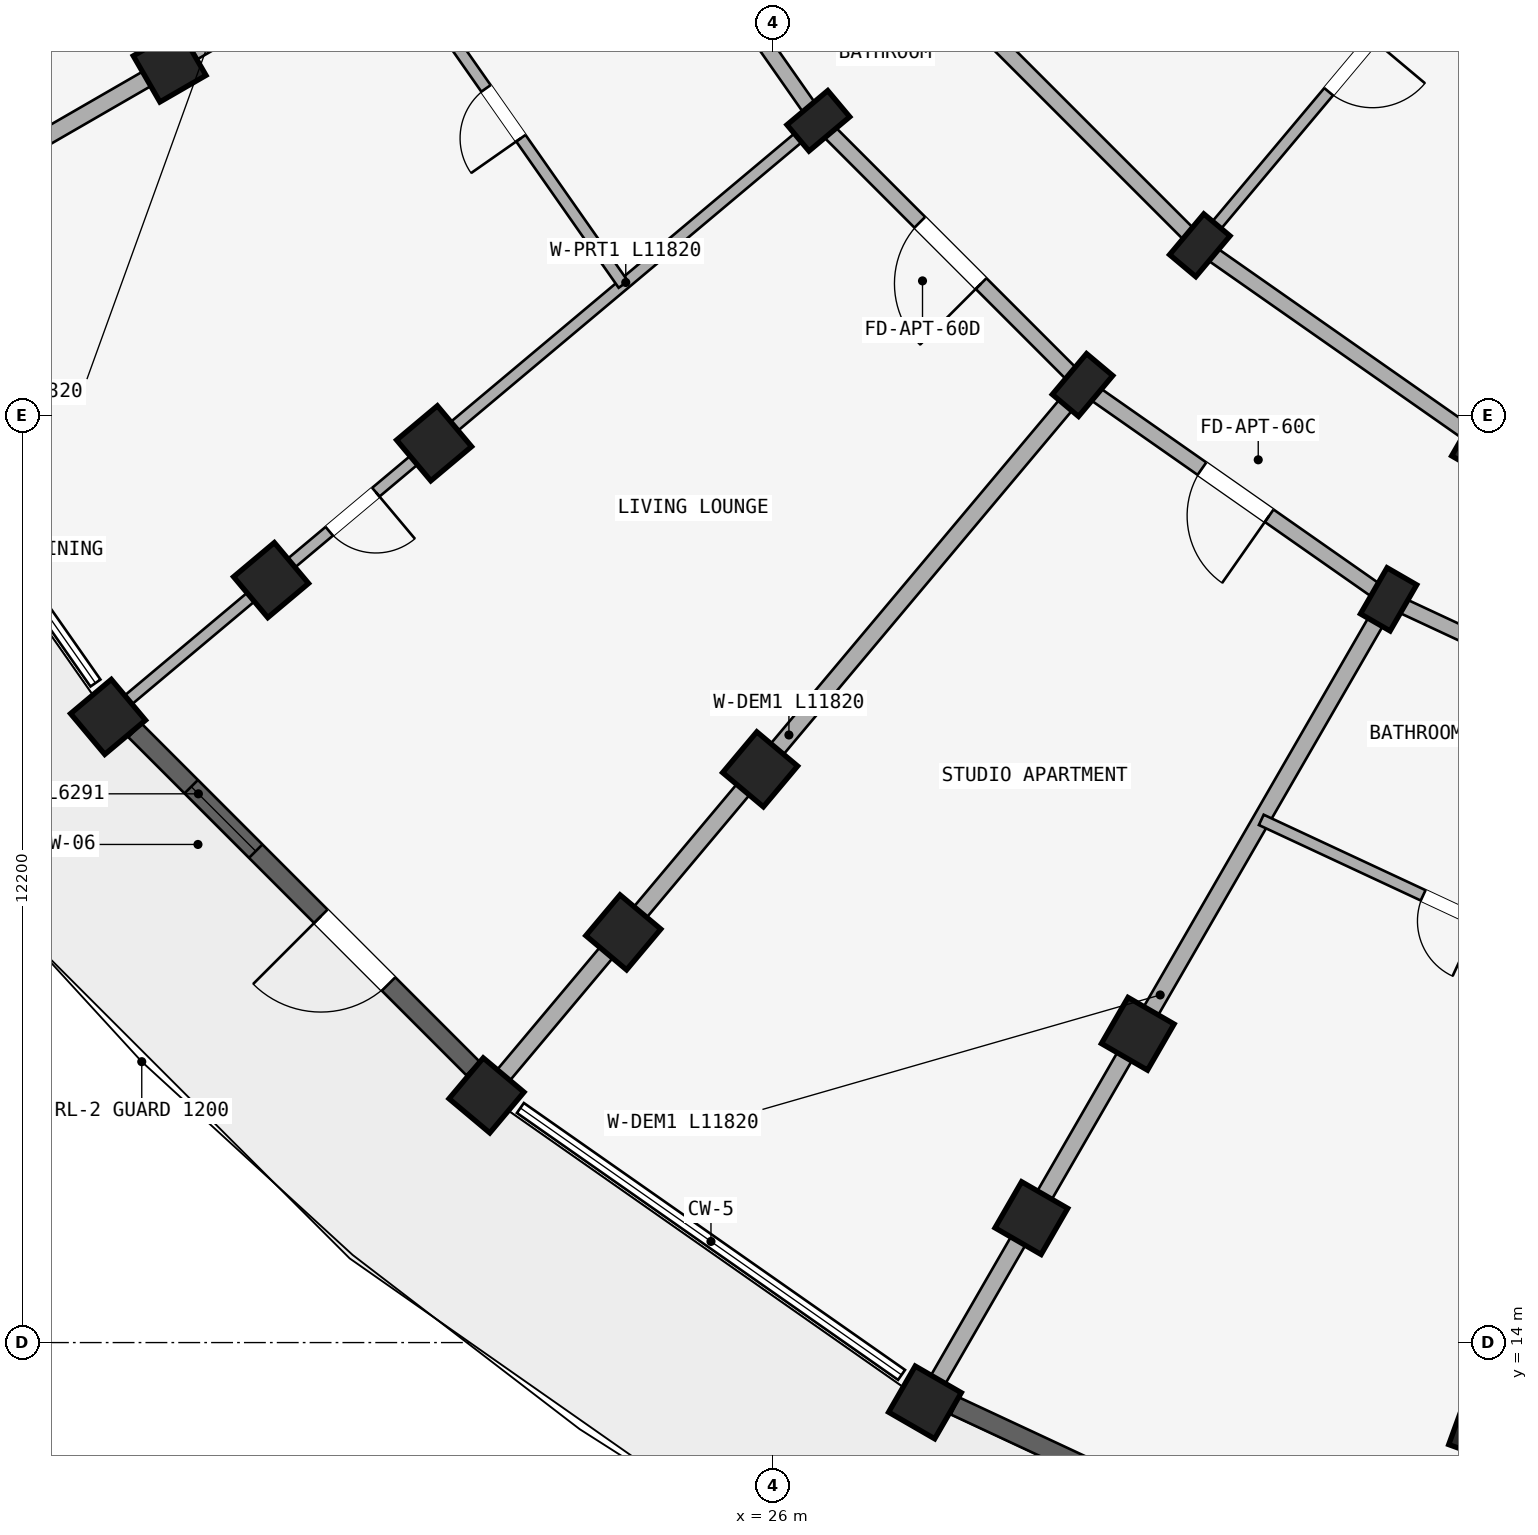
"""IFC4 building model, lengths in metres.
Left out: names, types, materials, properties, quantities, classifications, styles, units other than length and angle.
Written with IfcOpenShell. Run it as: python <this file> out.ifc"""

import sys

from ifc_helpers import new_model, si_unit, direction, frame, frame_2d, origin, origin_2d, place, context, subcontext, project, spatial, rectangle, extrude, element, fill, save


model = new_model("IFC4")
c1 = context("Model", 3, precision=1e-05, world=origin(), true_north=direction((0.0, 1.0)))
c2 = subcontext(c1, "Body", "Model", "MODEL_VIEW")
j1 = project(units=[si_unit("LENGTHUNIT", "METRE"), si_unit("PLANEANGLEUNIT", "RADIAN")], contexts=[c1])
p1 = place(None, origin())
s1 = spatial("IfcSite", under=j1, at=p1, CompositionType="ELEMENT")
p2 = place(p1, origin())
s2 = spatial("IfcBuilding", under=s1, at=p2, CompositionType="ELEMENT")
p3 = place(p2, frame((0.0, 0.0, 24.45)))
s3 = spatial("IfcBuildingStorey", under=s2, at=p3, CompositionType="ELEMENT", Elevation=24.45)
p4 = place(p3, frame((35.34, 12.868, 0.0), z_axis=(0.0, 0.0, 1.0), x_axis=(-0.939692620786, 0.342020143326, 0.0)))
e1 = element("IfcColumn", 1, at=p4, inside=s3, PredefinedType="COLUMN", context=c2, shape_type="SweptSolid", body=[
    extrude(rectangle(XDim=0.7, YDim=0.7, at=origin_2d()), origin(), (0.0, 0.0, 1.0), 2.93),
])
for number, where, z_axis, x_axis in (
    (2, (35.3, 25.856, 0.0), (0.0, 0.0, 1.0), (-0.866, 0.5, 0.0)),
    (3, (34.1, 23.778, 0.0), (0.0, 0.0, 1.0), (-0.866, 0.5, 0.0)),
):
    element("IfcColumn", number, at=place(p3, frame(where, z_axis=z_axis, x_axis=x_axis)), inside=s3, PredefinedType="COLUMN", context=c2, shape_type="SweptSolid", body=[
        extrude(rectangle(XDim=0.45, YDim=0.7, at=origin_2d()), origin(), (0.0, 0.0, 1.0), 2.93),
    ])
for number, where, z_axis, x_axis in (
    (4, (30.8, 18.062, 0.0), (0.0, 0.0, 1.0), (-0.866, 0.5, 0.0)),
    (5, (29.4, 15.637, 0.0), (0.0, 0.0, 1.0), (-0.866, 0.5, 0.0)),
):
    element("IfcColumn", number, at=place(p3, frame(where, z_axis=z_axis, x_axis=x_axis)), inside=s3, PredefinedType="COLUMN", context=c2, shape_type="SweptSolid", body=[
        extrude(rectangle(XDim=0.7, YDim=0.7, at=origin_2d()), origin(), (0.0, 0.0, 1.0), 2.93),
    ])
p5 = place(p3, frame((28.0, 13.213, 0.0), z_axis=(0.0, 0.0, 1.0), x_axis=(-0.866025403784, 0.5, 0.0)))
e6 = element("IfcColumn", 6, at=p5, inside=s3, PredefinedType="COLUMN", context=c2, shape_type="SweptSolid", body=[
    extrude(rectangle(XDim=0.7, YDim=0.7, at=origin_2d()), origin(), (0.0, 0.0, 1.0), 2.97),
])
for number, where, z_axis, x_axis in (
    (7, (31.616, 28.436, 0.0), (0.0, 0.0, 1.0), (-0.766, 0.643, 0.0)),
    (8, (30.073, 26.598, 0.0), (0.0, 0.0, 1.0), (-0.766, 0.643, 0.0)),
):
    element("IfcColumn", number, at=place(p3, frame(where, z_axis=z_axis, x_axis=x_axis)), inside=s3, PredefinedType="COLUMN", context=c2, shape_type="SweptSolid", body=[
        extrude(rectangle(XDim=0.45, YDim=0.7, at=origin_2d()), origin(), (0.0, 0.0, 1.0), 2.93),
    ])
for number, where, z_axis, x_axis in (
    (9, (25.831, 21.542, 0.0), (0.0, 0.0, 1.0), (-0.766, 0.643, 0.0)),
    (10, (24.031, 19.397, 0.0), (0.0, 0.0, 1.0), (-0.766, 0.643, 0.0)),
):
    element("IfcColumn", number, at=place(p3, frame(where, z_axis=z_axis, x_axis=x_axis)), inside=s3, PredefinedType="COLUMN", context=c2, shape_type="SweptSolid", body=[
        extrude(rectangle(XDim=0.7, YDim=0.7, at=origin_2d()), origin(), (0.0, 0.0, 1.0), 2.93),
    ])
p6 = place(p3, frame((22.231, 17.252, 0.0), z_axis=(0.0, 0.0, 1.0), x_axis=(-0.766044443119, 0.642787609687, 0.0)))
e11 = element("IfcColumn", 11, at=p6, inside=s3, PredefinedType="COLUMN", context=c2, shape_type="SweptSolid", body=[
    extrude(rectangle(XDim=0.7, YDim=0.7, at=origin_2d()), origin(), (0.0, 0.0, 1.0), 2.97),
])
p7 = place(p3, frame((26.598, 30.073, 0.0), z_axis=(0.0, 0.0, 1.0), x_axis=(-0.642787609687, 0.766044443119, 0.0)))
e12 = element("IfcColumn", 12, at=p7, inside=s3, PredefinedType="COLUMN", context=c2, shape_type="SweptSolid", body=[
    extrude(rectangle(XDim=0.45, YDim=0.7, at=origin_2d()), origin(), (0.0, 0.0, 1.0), 2.93),
])
for number, where, z_axis, x_axis in (
    (13, (21.542, 25.831, 0.0), (0.0, 0.0, 1.0), (-0.643, 0.766, 0.0)),
    (14, (19.397, 24.031, 0.0), (0.0, 0.0, 1.0), (-0.643, 0.766, 0.0)),
):
    element("IfcColumn", number, at=place(p3, frame(where, z_axis=z_axis, x_axis=x_axis)), inside=s3, PredefinedType="COLUMN", context=c2, shape_type="SweptSolid", body=[
        extrude(rectangle(XDim=0.7, YDim=0.7, at=origin_2d()), origin(), (0.0, 0.0, 1.0), 2.93),
    ])
p8 = place(p3, frame((17.252, 22.231, 0.0), z_axis=(0.0, 0.0, 1.0), x_axis=(-0.642787609687, 0.766044443119, 0.0)))
e15 = element("IfcColumn", 15, at=p8, inside=s3, PredefinedType="COLUMN", context=c2, shape_type="SweptSolid", body=[
    extrude(rectangle(XDim=0.7, YDim=0.7, at=origin_2d()), origin(), (0.0, 0.0, 1.0), 2.97),
])
p9 = place(p3, frame((18.062, 30.8, 0.0), z_axis=(0.0, 0.0, 1.0), x_axis=(-0.5, 0.866025403784, 0.0)))
e16 = element("IfcColumn", 16, at=p9, inside=s3, PredefinedType="COLUMN", context=c2, shape_type="SweptSolid", body=[
    extrude(rectangle(XDim=0.7, YDim=0.7, at=origin_2d()), origin(), (0.0, 0.0, 1.0), 2.93),
])
p10 = place(p3, frame((38.555, 21.701, 0.0), z_axis=(0.0, 0.0, 1.0), x_axis=(-0.906302381024, 0.422629854778, 0.0)))
e17 = element("IfcWall", 17, at=p10, inside=s3, PredefinedType="STANDARD", context=c2, shape_type="SweptSolid", body=[
    extrude(rectangle(XDim=4.915, YDim=0.2, at=frame_2d((2.458, 0.0))), origin(), (0.0, 0.0, 1.0), 2.372),
])
p11 = place(p3, frame((35.3, 25.856, 0.0), z_axis=(0.0, 0.0, 1.0), x_axis=(-0.819155404658, 0.573571637217, 0.0)))
e18 = element("IfcWall", 18, at=p11, inside=s3, PredefinedType="STANDARD", context=c2, shape_type="SweptSolid", body=[
    extrude(rectangle(XDim=4.497, YDim=0.2, at=frame_2d((2.249, 0.0))), origin(), (0.0, 0.0, 1.0), 2.372),
])
p12 = place(p3, frame((34.1, 23.778, 0.0), z_axis=(0.0, 0.0, 1.0), x_axis=(-0.819140911474, 0.573592335331, 0.0)))
e19 = element("IfcWall", 19, at=p12, inside=s3, PredefinedType="STANDARD", context=c2, shape_type="SweptSolid", body=[
    extrude(rectangle(XDim=4.916, YDim=0.2, at=frame_2d((2.458, 0.0))), origin(), (0.0, 0.0, 1.0), 2.372),
])
p13 = place(p12, frame((1.918, 0.0, 0.0)))
e20 = element("IfcOpeningElement", 20, at=p13, cuts=e19, PredefinedType="OPENING", context=c2, shape_type="SweptSolid", body=[
    extrude(rectangle(XDim=1.08, YDim=2.15, at=frame_2d((0.54, 1.075))), frame((0.0, 0.11, 0.0), z_axis=(0.0, -1.0, 0.0), x_axis=(1.0, 0.0, 0.0)), (0.0, 0.0, 1.0), 0.22),
])
p14 = place(p3, frame((31.616, 28.436, 0.0), z_axis=(0.0, 0.0, 1.0), x_axis=(-0.707106781187, 0.707106781187, 0.0)))
e21 = element("IfcWall", 21, at=p14, inside=s3, PredefinedType="STANDARD", context=c2, shape_type="SweptSolid", body=[
    extrude(rectangle(XDim=4.497, YDim=0.2, at=frame_2d((2.249, 0.0))), origin(), (0.0, 0.0, 1.0), 2.372),
])
p15 = place(p3, frame((30.073, 26.598, 0.0), z_axis=(0.0, 0.0, 1.0), x_axis=(-0.707106781187, 0.707106781187, 0.0)))
e22 = element("IfcWall", 22, at=p15, inside=s3, PredefinedType="STANDARD", context=c2, shape_type="SweptSolid", body=[
    extrude(rectangle(XDim=4.916, YDim=0.2, at=frame_2d((2.458, 0.0))), origin(), (0.0, 0.0, 1.0), 2.372),
])
p16 = place(p15, frame((1.888, 0.0, 0.0)))
e23 = element("IfcOpeningElement", 23, at=p16, cuts=e22, PredefinedType="OPENING", context=c2, shape_type="SweptSolid", body=[
    extrude(rectangle(XDim=1.14, YDim=2.15, at=frame_2d((0.57, 1.075))), frame((0.0, 0.11, 0.0), z_axis=(0.0, -1.0, 0.0), x_axis=(1.0, 0.0, 0.0)), (0.0, 0.0, 1.0), 0.22),
])
p17 = place(p3, frame((26.598, 30.073, 0.0), z_axis=(0.0, 0.0, 1.0), x_axis=(-0.573592335331, 0.819140911474, 0.0)))
e24 = element("IfcWall", 24, at=p17, inside=s3, PredefinedType="STANDARD", context=c2, shape_type="SweptSolid", body=[
    extrude(rectangle(XDim=4.916, YDim=0.2, at=frame_2d((2.458, 0.0))), origin(), (0.0, 0.0, 1.0), 2.372),
])
p18 = place(p3, frame((38.521, 21.607, 0.0), z_axis=(0.0, 0.0, 1.0), x_axis=(-0.342005081534, -0.939698102693, 0.0)))
e25 = element("IfcWall", 25, at=p18, inside=s3, PredefinedType="PARTITIONING", context=c2, shape_type="SweptSolid", body=[
    extrude(rectangle(XDim=11.82, YDim=0.15, at=frame_2d((5.91, 0.0))), origin(), (0.0, 0.0, 1.0), 2.372),
])
p19 = place(p18, frame((7.5, 0.0, 0.0)))
e26 = element("IfcOpeningElement", 26, at=p19, cuts=e25, PredefinedType="OPENING", context=c2, shape_type="SweptSolid", body=[
    extrude(rectangle(XDim=0.8, YDim=2.1, at=frame_2d((0.4, 1.05))), frame((0.0, 0.085, 0.0), z_axis=(0.0, -1.0, 0.0), x_axis=(1.0, 0.0, 0.0)), (0.0, 0.0, 1.0), 0.17),
])
p20 = place(p3, frame((34.05, 23.691, 0.0), z_axis=(0.0, 0.0, 1.0), x_axis=(-0.500013290014, -0.866017730655, 0.0)))
e27 = element("IfcWall", 27, at=p20, inside=s3, PredefinedType="STANDARD", context=c2, shape_type="SweptSolid", body=[
    extrude(rectangle(XDim=11.82, YDim=0.22, at=frame_2d((5.91, 0.0))), origin(), (0.0, 0.0, 1.0), 2.372),
])
p21 = place(p3, frame((35.987, 33.645, 0.0), z_axis=(0.0, 0.0, 1.0), x_axis=(-0.642784846501, -0.766046761698, 0.0)))
e28 = element("IfcWall", 28, at=p21, inside=s3, PredefinedType="PARTITIONING", context=c2, shape_type="SweptSolid", body=[
    extrude(rectangle(XDim=6.75, YDim=0.15, at=frame_2d((3.375, 0.0))), origin(), (0.0, 0.0, 1.0), 2.372),
])
p22 = place(p21, frame((3.262, 0.0, 0.0)))
e29 = element("IfcOpeningElement", 29, at=p22, cuts=e28, PredefinedType="OPENING", context=c2, shape_type="SweptSolid", body=[
    extrude(rectangle(XDim=0.9, YDim=2.1, at=frame_2d((0.45, 1.05))), frame((0.0, 0.085, 0.0), z_axis=(0.0, -1.0, 0.0), x_axis=(1.0, 0.0, 0.0)), (0.0, 0.0, 1.0), 0.17),
])
p23 = place(p3, frame((30.009, 26.521, 0.0), z_axis=(0.0, 0.0, 1.0), x_axis=(-0.642781220531, -0.766049804211, 0.0)))
e30 = element("IfcWall", 30, at=p23, inside=s3, PredefinedType="STANDARD", context=c2, shape_type="SweptSolid", body=[
    extrude(rectangle(XDim=11.82, YDim=0.22, at=frame_2d((5.91, 0.0))), origin(), (0.0, 0.0, 1.0), 2.372),
])
p24 = place(p3, frame((26.521, 30.009, 0.0), z_axis=(0.0, 0.0, 1.0), x_axis=(-0.766049804211, -0.642781220531, 0.0)))
e31 = element("IfcWall", 31, at=p24, inside=s3, PredefinedType="PARTITIONING", context=c2, shape_type="SweptSolid", body=[
    extrude(rectangle(XDim=11.82, YDim=0.15, at=frame_2d((5.91, 0.0))), origin(), (0.0, 0.0, 1.0), 2.372),
])
p25 = place(p24, frame((7.5, 0.0, 0.0)))
e32 = element("IfcOpeningElement", 32, at=p25, cuts=e31, PredefinedType="OPENING", context=c2, shape_type="SweptSolid", body=[
    extrude(rectangle(XDim=0.8, YDim=2.1, at=frame_2d((0.4, 1.05))), frame((0.0, 0.085, 0.0), z_axis=(0.0, -1.0, 0.0), x_axis=(1.0, 0.0, 0.0)), (0.0, 0.0, 1.0), 0.17),
])
p26 = place(p3, frame((23.691, 34.05, 0.0), z_axis=(0.0, 0.0, 1.0), x_axis=(-0.866017730655, -0.500013290014, 0.0)))
e33 = element("IfcWall", 33, at=p26, inside=s3, PredefinedType="STANDARD", context=c2, shape_type="SweptSolid", body=[
    extrude(rectangle(XDim=11.82, YDim=0.22, at=frame_2d((5.91, 0.0))), origin(), (0.0, 0.0, 1.0), 2.372),
])
p27 = place(p3, frame((37.409, 18.553, 0.0), z_axis=(0.0, 0.0, 1.0), x_axis=(-0.906302189986, 0.422630264446, 0.0)))
e34 = element("IfcWall", 34, at=p27, inside=s3, PredefinedType="PLUMBINGWALL", context=c2, shape_type="SweptSolid", body=[
    extrude(rectangle(XDim=5.5, YDim=0.15, at=frame_2d((2.75, 0.0))), origin(), (0.0, 0.0, 1.0), 2.372),
])
p28 = place(p27, frame((2.35, 0.0, 0.0)))
e35 = element("IfcOpeningElement", 35, at=p28, cuts=e34, PredefinedType="OPENING", context=c2, shape_type="SweptSolid", body=[
    extrude(rectangle(XDim=0.8, YDim=2.1, at=frame_2d((0.4, 1.05))), frame((0.0, 0.085, 0.0), z_axis=(0.0, -1.0, 0.0), x_axis=(1.0, 0.0, 0.0)), (0.0, 0.0, 1.0), 0.17),
])
p29 = place(p3, frame((24.031, 27.92, 0.0), z_axis=(0.0, 0.0, 1.0), x_axis=(-0.573569599955, 0.819156831143, 0.0)))
e36 = element("IfcWall", 36, at=p29, inside=s3, PredefinedType="PLUMBINGWALL", context=c2, shape_type="SweptSolid", body=[
    extrude(rectangle(XDim=5.5, YDim=0.15, at=frame_2d((2.75, 0.0))), origin(), (0.0, 0.0, 1.0), 2.372),
])
p30 = place(p29, frame((2.35, 0.0, 0.0)))
e37 = element("IfcOpeningElement", 37, at=p30, cuts=e36, PredefinedType="OPENING", context=c2, shape_type="SweptSolid", body=[
    extrude(rectangle(XDim=0.8, YDim=2.1, at=frame_2d((0.4, 1.05))), frame((0.0, 0.085, 0.0), z_axis=(0.0, -1.0, 0.0), x_axis=(1.0, 0.0, 0.0)), (0.0, 0.0, 1.0), 0.17),
])
p31 = place(p3, frame((34.094, 10.509, 0.0), z_axis=(0.0, 0.0, 1.0), x_axis=(-0.906304072383, 0.42262622775, 0.0)))
e38 = element("IfcWall", 38, at=p31, inside=s3, PredefinedType="STANDARD", context=c2, shape_type="SweptSolid", body=[
    extrude(rectangle(XDim=6.29, YDim=0.25, at=frame_2d((3.145, 0.0))), origin(), (0.0, 0.0, 1.0), 2.412),
])
p32 = place(p31, frame((2.045, 0.0, 0.312)))
e39 = element("IfcOpeningElement", 39, at=p32, cuts=e38, PredefinedType="OPENING", context=c2, shape_type="SweptSolid", body=[
    extrude(rectangle(XDim=2.2, YDim=1.9, at=frame_2d((1.1, 0.95))), frame((0.0, 0.135, 0.0), z_axis=(0.0, -1.0, 0.0), x_axis=(1.0, 0.0, 0.0)), (0.0, 0.0, 1.0), 0.27),
])
p33 = place(p3, frame((22.054, 17.606, 0.0), z_axis=(0.0, 0.0, 1.0), x_axis=(-0.707106781187, 0.707106781187, 0.0)))
e40 = element("IfcWall", 40, at=p33, inside=s3, PredefinedType="STANDARD", context=c2, shape_type="SweptSolid", body=[
    extrude(rectangle(XDim=6.291, YDim=0.25, at=frame_2d((3.145, 0.0))), origin(), (0.0, 0.0, 1.0), 2.412),
])
p34 = place(p33, frame((4.043, 0.0, 0.562)))
e41 = element("IfcOpeningElement", 41, at=p34, cuts=e40, PredefinedType="OPENING", context=c2, shape_type="SweptSolid", body=[
    extrude(rectangle(XDim=1.2, YDim=1.5, at=frame_2d((0.6, 0.75))), frame((0.0, 0.135, 0.0), z_axis=(0.0, -1.0, 0.0), x_axis=(1.0, 0.0, 0.0)), (0.0, 0.0, 1.0), 0.27),
])
p35 = place(p33, frame((1.572, 0.0, 0.0)))
e42 = element("IfcOpeningElement", 42, at=p35, cuts=e40, PredefinedType="OPENING", context=c2, shape_type="SweptSolid", body=[
    extrude(rectangle(XDim=1.26, YDim=2.15, at=frame_2d((0.63, 1.075))), frame((0.0, 0.135, 0.0), z_axis=(0.0, -1.0, 0.0), x_axis=(1.0, 0.0, 0.0)), (0.0, 0.0, 1.0), 0.27),
])
p36 = place(p34, origin())
e43 = element("IfcWindow", 43, at=p36, inside=s3, PartitioningType="SINGLE_PANEL", PredefinedType="WINDOW", context=c2, shape_type="SweptSolid", body=[
    extrude(rectangle(XDim=1.2, YDim=1.5, at=frame_2d((0.6, 0.75))), frame((0.0, 0.03, 0.0), z_axis=(0.0, -1.0, 0.0), x_axis=(1.0, 0.0, 0.0)), (0.0, 0.0, 1.0), 0.06),
])
fill(e41, e43)
p37 = place(p22, frame((0.9, 0.0, 0.0), z_axis=(0.0, 0.0, 1.0), x_axis=(-1.0, 0.0, 0.0)))
e44 = element("IfcDoor", 44, at=p37, inside=s3, OperationType="SINGLE_SWING_RIGHT", PredefinedType="DOOR", context=c2, shape_type="SweptSolid", body=[
    extrude(rectangle(XDim=0.9, YDim=2.1, at=frame_2d((0.45, 1.05))), frame((0.0, 0.025, 0.0), z_axis=(0.0, -1.0, 0.0), x_axis=(1.0, 0.0, 0.0)), (0.0, 0.0, 1.0), 0.05),
])
fill(e29, e44)
p38 = place(p25, origin())
e45 = element("IfcDoor", 45, at=p38, inside=s3, OperationType="SINGLE_SWING_LEFT", PredefinedType="DOOR", context=c2, shape_type="SweptSolid", body=[
    extrude(rectangle(XDim=0.8, YDim=2.1, at=frame_2d((0.4, 1.05))), frame((0.0, 0.025, 0.0), z_axis=(0.0, -1.0, 0.0), x_axis=(1.0, 0.0, 0.0)), (0.0, 0.0, 1.0), 0.05),
])
fill(e32, e45)
p39 = place(p28, frame((0.8, 0.0, 0.0), z_axis=(0.0, 0.0, 1.0), x_axis=(-1.0, 0.0, 0.0)))
e46 = element("IfcDoor", 46, at=p39, inside=s3, OperationType="SINGLE_SWING_RIGHT", PredefinedType="DOOR", context=c2, shape_type="SweptSolid", body=[
    extrude(rectangle(XDim=0.8, YDim=2.1, at=frame_2d((0.4, 1.05))), frame((0.0, 0.025, 0.0), z_axis=(0.0, -1.0, 0.0), x_axis=(1.0, 0.0, 0.0)), (0.0, 0.0, 1.0), 0.05),
])
fill(e35, e46)
p40 = place(p13, origin())
e47 = element("IfcDoor", 47, at=p40, inside=s3, OperationType="SINGLE_SWING_LEFT", PredefinedType="DOOR", context=c2, shape_type="SweptSolid", body=[
    extrude(rectangle(XDim=1.08, YDim=2.15, at=frame_2d((0.54, 1.075))), frame((0.0, 0.025, 0.0), z_axis=(0.0, -1.0, 0.0), x_axis=(1.0, 0.0, 0.0)), (0.0, 0.0, 1.0), 0.05),
])
fill(e20, e47)
p41 = place(p16, frame((1.14, 0.0, 0.0), z_axis=(0.0, 0.0, 1.0), x_axis=(-1.0, 0.0, 0.0)))
e48 = element("IfcDoor", 48, at=p41, inside=s3, OperationType="SINGLE_SWING_RIGHT", PredefinedType="DOOR", context=c2, shape_type="SweptSolid", body=[
    extrude(rectangle(XDim=1.14, YDim=2.15, at=frame_2d((0.57, 1.075))), frame((0.0, 0.025, 0.0), z_axis=(0.0, -1.0, 0.0), x_axis=(1.0, 0.0, 0.0)), (0.0, 0.0, 1.0), 0.05),
])
fill(e23, e48)
p42 = place(p30, origin())
e49 = element("IfcDoor", 49, at=p42, inside=s3, OperationType="SINGLE_SWING_LEFT", PredefinedType="DOOR", context=c2, shape_type="SweptSolid", body=[
    extrude(rectangle(XDim=0.8, YDim=2.1, at=frame_2d((0.4, 1.05))), frame((0.0, 0.025, 0.0), z_axis=(0.0, -1.0, 0.0), x_axis=(1.0, 0.0, 0.0)), (0.0, 0.0, 1.0), 0.05),
])
fill(e37, e49)
p43 = place(p35, origin())
e50 = element("IfcDoor", 50, at=p43, inside=s3, OperationType="SINGLE_SWING_RIGHT", PredefinedType="DOOR", context=c2, shape_type="SweptSolid", body=[
    extrude(rectangle(XDim=1.26, YDim=2.15, at=frame_2d((0.63, 1.075))), frame((0.0, 0.025, 0.0), z_axis=(0.0, -1.0, 0.0), x_axis=(1.0, 0.0, 0.0)), (0.0, 0.0, 1.0), 0.05),
])
fill(e42, e50)
save(model, sys.argv[1])
